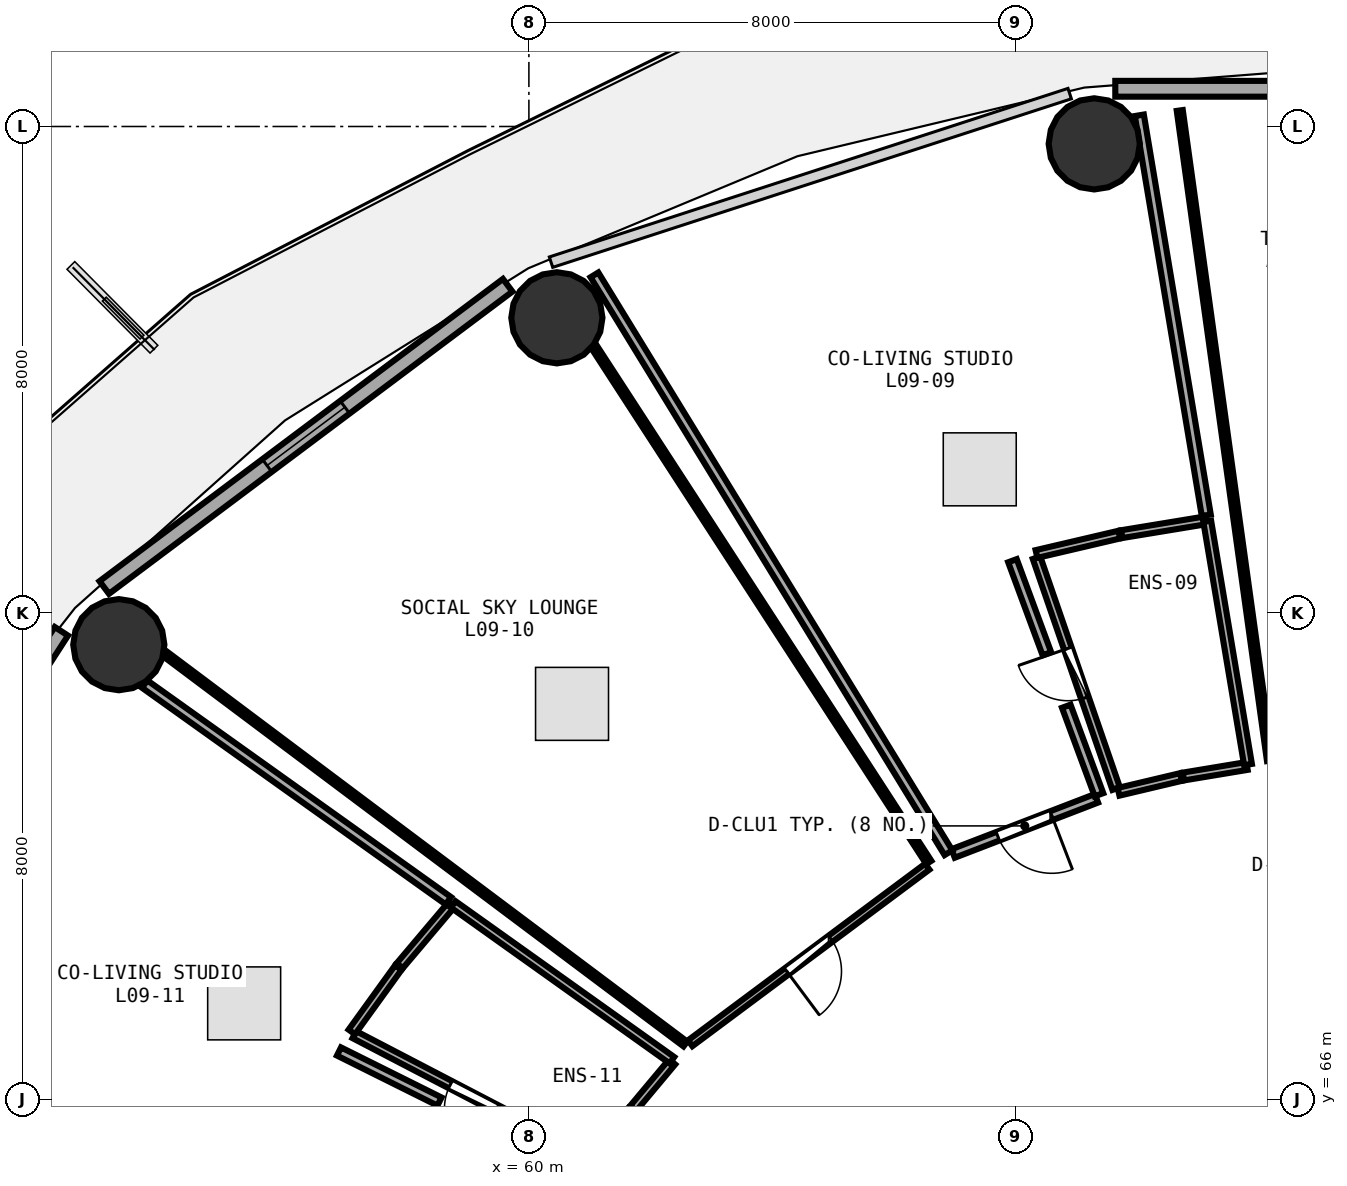
"""IFC4 building model, lengths in metres.
Left out: names, types, materials, properties, quantities, classifications, styles, units other than length and angle.
Written with IfcOpenShell. Run it as: python <this file> out.ifc"""

import sys

from ifc_helpers import new_model, si_unit, direction, frame, frame_2d, origin, origin_2d, place, context, subcontext, project, spatial, rectangle, circle, extrude, element, fill, save


model = new_model("IFC4")
c1 = context("Model", 3, precision=1e-05, world=origin(), true_north=direction((0.0, 1.0)))
c2 = subcontext(c1, "Body", "Model", "MODEL_VIEW")
j1 = project(units=[si_unit("LENGTHUNIT", "METRE"), si_unit("PLANEANGLEUNIT", "RADIAN")], contexts=[c1])
p1 = place(None, origin())
s1 = spatial("IfcSite", under=j1, at=p1, CompositionType="ELEMENT")
p2 = place(p1, origin())
s2 = spatial("IfcBuilding", under=s1, at=p2, CompositionType="ELEMENT")
p3 = place(p2, frame((0.0, 0.0, 37.5)))
s3 = spatial("IfcBuildingStorey", under=s2, at=p3, CompositionType="ELEMENT", Elevation=37.5)
for number, where, z_axis, x_axis in (
    (1, (69.298, 81.714, 0.0), (0.0, 0.0, 1.0), (1.0, 0.0, 0.0)),
    (2, (60.46, 78.854, 0.0), (0.0, 0.0, 1.0), (1.0, 0.0, 0.0)),
    (3, (53.256, 73.478, 0.0), (0.0, 0.0, 1.0), (1.0, 0.0, 0.0)),
):
    element("IfcColumn", number, at=place(p3, frame(where, z_axis=z_axis, x_axis=x_axis)), inside=s3, PredefinedType="COLUMN", context=c2, shape_type="SweptSolid", body=[
        extrude(circle(Radius=0.75, at=origin_2d()), origin(), (0.0, 0.0, 1.0), 3.75),
    ])
p4 = place(p3, frame((78.356, 82.62, 0.0), z_axis=(0.0, 0.0, 1.0), x_axis=(-1.0, 0.0, 0.0)))
e4 = element("IfcWall", 4, at=p4, inside=s3, PredefinedType="SOLIDWALL", context=c2, shape_type="SweptSolid", body=[
    extrude(rectangle(XDim=8.712, YDim=0.26, at=frame_2d((4.356, 0.0))), origin(), (0.0, 0.0, 1.0), 3.475),
])
p5 = place(p4, frame((3.556, 0.0, 0.85)))
e5 = element("IfcOpeningElement", 5, at=p5, cuts=e4, PredefinedType="OPENING", context=c2, shape_type="SweptSolid", body=[
    extrude(rectangle(XDim=1.6, YDim=1.45, at=frame_2d((0.8, 0.725))), frame((0.0, 0.14, 0.0), z_axis=(0.0, -1.0, 0.0), x_axis=(1.0, 0.0, 0.0)), (0.0, 0.0, 1.0), 0.28),
])
p6 = place(p3, frame((59.651, 79.389, 0.0), z_axis=(0.0, 0.0, 1.0), x_axis=(-0.80030733173, -0.599590005569, 0.0)))
e6 = element("IfcWall", 6, at=p6, inside=s3, PredefinedType="SOLIDWALL", context=c2, shape_type="SweptSolid", body=[
    extrude(rectangle(XDim=8.291, YDim=0.26, at=frame_2d((4.145, 0.0))), origin(), (0.0, 0.0, 1.0), 3.475),
])
p7 = place(p6, frame((3.345, 0.0, 0.85)))
e7 = element("IfcOpeningElement", 7, at=p7, cuts=e6, PredefinedType="OPENING", context=c2, shape_type="SweptSolid", body=[
    extrude(rectangle(XDim=1.6, YDim=1.45, at=frame_2d((0.8, 0.725))), frame((0.0, 0.14, 0.0), z_axis=(0.0, -1.0, 0.0), x_axis=(1.0, 0.0, 0.0)), (0.0, 0.0, 1.0), 0.28),
])
p8 = place(p3, frame((52.311, 73.698, 0.0), z_axis=(0.0, 0.0, 1.0), x_axis=(-0.543005114258, -0.839729388488, 0.0)))
e8 = element("IfcWall", 8, at=p8, inside=s3, PredefinedType="SOLIDWALL", context=c2, shape_type="SweptSolid", body=[
    extrude(rectangle(XDim=7.938, YDim=0.26, at=frame_2d((3.969, 0.0))), origin(), (0.0, 0.0, 1.0), 3.475),
])
p9 = place(p8, frame((3.494, 0.0, 0.0)))
e9 = element("IfcOpeningElement", 9, at=p9, cuts=e8, PredefinedType="OPENING", context=c2, shape_type="SweptSolid", body=[
    extrude(rectangle(XDim=0.95, YDim=2.1, at=frame_2d((0.475, 1.05))), frame((0.0, 0.14, 0.0), z_axis=(0.0, -1.0, 0.0), x_axis=(1.0, 0.0, 0.0)), (0.0, 0.0, 1.0), 0.28),
])
p10 = place(p8, frame((4.794, 0.0, 0.85)))
e10 = element("IfcOpeningElement", 10, at=p10, cuts=e8, PredefinedType="OPENING", context=c2, shape_type="SweptSolid", body=[
    extrude(rectangle(XDim=1.2, YDim=1.45, at=frame_2d((0.6, 0.725))), frame((0.0, 0.14, 0.0), z_axis=(0.0, -1.0, 0.0), x_axis=(1.0, 0.0, 0.0)), (0.0, 0.0, 1.0), 0.28),
])
p11 = place(p3, frame((69.658, 71.111, 0.0), z_axis=(0.0, 0.0, 1.0), x_axis=(-0.326056236537, 0.945350374525, 0.0)))
e11 = element("IfcWall", 11, at=p11, inside=s3, PredefinedType="PLUMBINGWALL", context=c2, shape_type="SweptSolid", body=[
    extrude(rectangle(XDim=4.017, YDim=0.13, at=frame_2d((2.009, 0.0))), origin(), (0.0, 0.0, 1.0), 3.175),
])
p12 = place(p11, frame((1.579, 0.0, 0.0)))
e12 = element("IfcOpeningElement", 12, at=p12, cuts=e11, PredefinedType="OPENING", context=c2, shape_type="SweptSolid", body=[
    extrude(rectangle(XDim=0.86, YDim=2.05, at=frame_2d((0.43, 1.025))), frame((0.0, 0.075, 0.0), z_axis=(0.0, -1.0, 0.0), x_axis=(1.0, 0.0, 0.0)), (0.0, 0.0, 1.0), 0.15),
])
p13 = place(p3, frame((69.334, 70.951, 0.0), z_axis=(0.0, 0.0, 1.0), x_axis=(-0.933283302704, -0.35914102647, 0.0)))
e13 = element("IfcWall", 13, at=p13, inside=s3, PredefinedType="PARTITIONING", context=c2, shape_type="SweptSolid", body=[
    extrude(rectangle(XDim=2.525, YDim=0.15, at=frame_2d((1.263, 0.0))), origin(), (0.0, 0.0, 1.0), 3.48),
])
p14 = place(p13, frame((0.788, 0.0, 0.0)))
e14 = element("IfcOpeningElement", 14, at=p14, cuts=e13, PredefinedType="OPENING", context=c2, shape_type="SweptSolid", body=[
    extrude(rectangle(XDim=0.95, YDim=2.08, at=frame_2d((0.475, 1.04))), frame((0.0, 0.085, 0.0), z_axis=(0.0, -1.0, 0.0), x_axis=(1.0, 0.0, 0.0)), (0.0, 0.0, 1.0), 0.17),
])
p15 = place(p3, frame((66.551, 69.827, 0.0), z_axis=(0.0, 0.0, 1.0), x_axis=(-0.801966818386, -0.597368581537, 0.0)))
e15 = element("IfcWall", 15, at=p15, inside=s3, PredefinedType="PARTITIONING", context=c2, shape_type="SweptSolid", body=[
    extrude(rectangle(XDim=4.86, YDim=0.12, at=frame_2d((2.43, 0.0))), origin(), (0.0, 0.0, 1.0), 2.875),
])
p16 = place(p15, frame((1.98, 0.0, 0.0)))
e16 = element("IfcOpeningElement", 16, at=p16, cuts=e15, PredefinedType="OPENING", context=c2, shape_type="SweptSolid", body=[
    extrude(rectangle(XDim=0.9, YDim=2.08, at=frame_2d((0.45, 1.04))), frame((0.0, 0.07, 0.0), z_axis=(0.0, -1.0, 0.0), x_axis=(1.0, 0.0, 0.0)), (0.0, 0.0, 1.0), 0.14),
])
p17 = place(p3, frame((61.049, 65.025, 0.0), z_axis=(0.0, 0.0, 1.0), x_axis=(-0.887004135063, 0.461761479966, 0.0)))
e17 = element("IfcWall", 17, at=p17, inside=s3, PredefinedType="PLUMBINGWALL", context=c2, shape_type="SweptSolid", body=[
    extrude(rectangle(XDim=4.419, YDim=0.13, at=frame_2d((2.209, 0.0))), origin(), (0.0, 0.0, 1.0), 2.875),
])
p18 = place(p17, frame((1.779, 0.0, 0.0)))
e18 = element("IfcOpeningElement", 18, at=p18, cuts=e17, PredefinedType="OPENING", context=c2, shape_type="SweptSolid", body=[
    extrude(rectangle(XDim=0.86, YDim=2.05, at=frame_2d((0.43, 1.025))), frame((0.0, 0.075, 0.0), z_axis=(0.0, -1.0, 0.0), x_axis=(1.0, 0.0, 0.0)), (0.0, 0.0, 1.0), 0.15),
])
p19 = place(p3, frame((72.188, 71.571, 0.0), z_axis=(0.0, 0.0, 1.0), x_axis=(-0.137456200911, 0.990507845921, 0.0)))
e19 = element("IfcWall", 19, at=p19, inside=s3, PredefinedType="PARTITIONING", context=c2, shape_type="SweptSolid", body=[
    extrude(rectangle(XDim=10.795, YDim=0.1, at=frame_2d((5.398, 0.0))), origin(), (0.0, 0.0, 1.0), 2.875),
])
p20 = place(p3, frame((71.81, 71.484, 0.0), z_axis=(0.0, 0.0, 1.0), x_axis=(-0.986536732665, -0.163539827269, 0.0)))
e20 = element("IfcWall", 20, at=p20, inside=s3, PredefinedType="PLUMBINGWALL", context=c2, shape_type="SweptSolid", body=[
    extrude(rectangle(XDim=1.06, YDim=0.13, at=frame_2d((0.53, 0.0))), origin(), (0.0, 0.0, 1.0), 2.875),
])
p21 = place(p3, frame((70.726, 71.302, 0.0), z_axis=(0.0, 0.0, 1.0), x_axis=(-0.972994310962, -0.230829094431, 0.0)))
e21 = element("IfcWall", 21, at=p21, inside=s3, PredefinedType="PLUMBINGWALL", context=c2, shape_type="SweptSolid", body=[
    extrude(rectangle(XDim=1.057, YDim=0.13, at=frame_2d((0.528, 0.0))), origin(), (0.0, 0.0, 1.0), 2.875),
])
p22 = place(p3, frame((68.348, 74.969, 0.0), z_axis=(0.0, 0.0, 1.0), x_axis=(0.973677466502, 0.227930233241, 0.0)))
e22 = element("IfcWall", 22, at=p22, inside=s3, PredefinedType="PLUMBINGWALL", context=c2, shape_type="SweptSolid", body=[
    extrude(rectangle(XDim=1.399, YDim=0.13, at=frame_2d((0.699, 0.0))), origin(), (0.0, 0.0, 1.0), 3.48),
])
p23 = place(p3, frame((69.75, 75.296, 0.0), z_axis=(0.0, 0.0, 1.0), x_axis=(0.986744598887, 0.162280918681, 0.0)))
e23 = element("IfcWall", 23, at=p23, inside=s3, PredefinedType="PLUMBINGWALL", context=c2, shape_type="SweptSolid", body=[
    extrude(rectangle(XDim=1.402, YDim=0.13, at=frame_2d((0.701, 0.0))), origin(), (0.0, 0.0, 1.0), 2.875),
])
p24 = place(p3, frame((71.156, 75.507, 0.0), z_axis=(0.0, 0.0, 1.0), x_axis=(0.165267537024, -0.986248772474, 0.0)))
e24 = element("IfcWall", 24, at=p24, inside=s3, PredefinedType="PLUMBINGWALL", context=c2, shape_type="SweptSolid", body=[
    extrude(rectangle(XDim=4.056, YDim=0.13, at=frame_2d((2.028, 0.0))), origin(), (0.0, 0.0, 1.0), 3.175),
])
p25 = place(p3, frame((66.9, 70.057, 0.0), z_axis=(0.0, 0.0, 1.0), x_axis=(-0.522434140672, 0.852679640111, 0.0)))
e25 = element("IfcWall", 25, at=p25, inside=s3, PredefinedType="PARTITIONING", context=c2, shape_type="SweptSolid", body=[
    extrude(rectangle(XDim=11.145, YDim=0.15, at=frame_2d((5.572, 0.0))), origin(), (0.0, 0.0, 1.0), 2.875),
])
p26 = place(p3, frame((70.04, 82.185, 0.0), z_axis=(0.0, 0.0, 1.0), x_axis=(0.165051905183, -0.986284882068, 0.0)))
e26 = element("IfcWall", 26, at=p26, inside=s3, PredefinedType="PARTITIONING", context=c2, shape_type="SweptSolid", body=[
    extrude(rectangle(XDim=6.67, YDim=0.15, at=frame_2d((3.335, 0.0))), origin(), (0.0, 0.0, 1.0), 2.875),
])
p27 = place(p3, frame((67.953, 74.86, 0.0), z_axis=(0.0, 0.0, 1.0), x_axis=(0.346856200849, -0.937918320502, 0.0)))
e27 = element("IfcWall", 27, at=p27, inside=s3, PredefinedType="PARTITIONING", context=c2, shape_type="SweptSolid", body=[
    extrude(rectangle(XDim=1.632, YDim=0.15, at=frame_2d((0.816, 0.0))), origin(), (0.0, 0.0, 1.0), 3.175),
])
p28 = place(p3, frame((68.838, 72.466, 0.0), z_axis=(0.0, 0.0, 1.0), x_axis=(0.346827635281, -0.937928883981, 0.0)))
e28 = element("IfcWall", 28, at=p28, inside=s3, PredefinedType="PARTITIONING", context=c2, shape_type="SweptSolid", body=[
    extrude(rectangle(XDim=1.552, YDim=0.15, at=frame_2d((0.776, 0.0))), origin(), (0.0, 0.0, 1.0), 3.235),
])
p29 = place(p3, frame((62.573, 66.912, 0.0), z_axis=(0.0, 0.0, 1.0), x_axis=(-0.800175286691, 0.599766213261, 0.0)))
e29 = element("IfcWall", 29, at=p29, inside=s3, PredefinedType="PARTITIONING", context=c2, shape_type="SweptSolid", body=[
    extrude(rectangle(XDim=10.695, YDim=0.1, at=frame_2d((5.347, 0.0))), origin(), (0.0, 0.0, 1.0), 2.875),
])
p30 = place(p3, frame((61.071, 78.377, 0.0), z_axis=(0.0, 0.0, 1.0), x_axis=(0.544546108356, -0.838730907904, 0.0)))
e30 = element("IfcWall", 30, at=p30, inside=s3, PredefinedType="PARTITIONING", context=c2, shape_type="SweptSolid", body=[
    extrude(rectangle(XDim=10.111, YDim=0.1, at=frame_2d((5.056, 0.0))), origin(), (0.0, 0.0, 1.0), 3.175),
])
p31 = place(p3, frame((62.356, 66.618, 0.0), z_axis=(0.0, 0.0, 1.0), x_axis=(-0.641793013208, -0.766877909577, 0.0)))
e31 = element("IfcWall", 31, at=p31, inside=s3, PredefinedType="PLUMBINGWALL", context=c2, shape_type="SweptSolid", body=[
    extrude(rectangle(XDim=0.999, YDim=0.13, at=frame_2d((0.5, 0.0))), origin(), (0.0, 0.0, 1.0), 3.48),
])
p32 = place(p3, frame((57.088, 67.109, 0.0), z_axis=(0.0, 0.0, 1.0), x_axis=(0.585545160258, 0.810639787636, 0.0)))
e32 = element("IfcWall", 32, at=p32, inside=s3, PredefinedType="PLUMBINGWALL", context=c2, shape_type="SweptSolid", body=[
    extrude(rectangle(XDim=1.306, YDim=0.13, at=frame_2d((0.653, 0.0))), origin(), (0.0, 0.0, 1.0), 3.48),
])
p33 = place(p3, frame((57.877, 68.199, 0.0), z_axis=(0.0, 0.0, 1.0), x_axis=(0.645609332361, 0.763667853172, 0.0)))
e33 = element("IfcWall", 33, at=p33, inside=s3, PredefinedType="PLUMBINGWALL", context=c2, shape_type="SweptSolid", body=[
    extrude(rectangle(XDim=1.315, YDim=0.13, at=frame_2d((0.658, 0.0))), origin(), (0.0, 0.0, 1.0), 3.48),
])
p34 = place(p3, frame((58.755, 69.208, 0.0), z_axis=(0.0, 0.0, 1.0), x_axis=(0.814438714594, -0.580249584378, 0.0)))
e34 = element("IfcWall", 34, at=p34, inside=s3, PredefinedType="PLUMBINGWALL", context=c2, shape_type="SweptSolid", body=[
    extrude(rectangle(XDim=4.417, YDim=0.13, at=frame_2d((2.208, 0.0))), origin(), (0.0, 0.0, 1.0), 3.235),
])
p35 = place(p3, frame((59.794, 62.562, 0.0), z_axis=(0.0, 0.0, 1.0), x_axis=(-0.955526502323, 0.294905244712, 0.0)))
e35 = element("IfcWall", 35, at=p35, inside=s3, PredefinedType="PARTITIONING", context=c2, shape_type="SweptSolid", body=[
    extrude(rectangle(XDim=11.074, YDim=0.15, at=frame_2d((5.537, 0.0))), origin(), (0.0, 0.0, 1.0), 3.175),
])
p36 = place(p3, frame((53.681, 72.83, 0.0), z_axis=(0.0, 0.0, 1.0), x_axis=(0.81406941819, -0.580767580335, 0.0)))
e36 = element("IfcWall", 36, at=p36, inside=s3, PredefinedType="PARTITIONING", context=c2, shape_type="SweptSolid", body=[
    extrude(rectangle(XDim=6.135, YDim=0.15, at=frame_2d((3.068, 0.0))), origin(), (0.0, 0.0, 1.0), 3.175),
])
p37 = place(p3, frame((56.877, 66.788, 0.0), z_axis=(0.0, 0.0, 1.0), x_axis=(0.895219183004, -0.445626092573, 0.0)))
e37 = element("IfcWall", 37, at=p37, inside=s3, PredefinedType="PARTITIONING", context=c2, shape_type="SweptSolid", body=[
    extrude(rectangle(XDim=1.846, YDim=0.15, at=frame_2d((0.923, 0.0))), origin(), (0.0, 0.0, 1.0), 3.48),
])
p38 = place(p7, origin())
e38 = element("IfcWindow", 38, at=p38, inside=s3, PartitioningType="SINGLE_PANEL", PredefinedType="WINDOW", context=c2, shape_type="SweptSolid", body=[
    extrude(rectangle(XDim=1.6, YDim=1.45, at=frame_2d((0.8, 0.725))), frame((0.0, 0.03, 0.0), z_axis=(0.0, -1.0, 0.0), x_axis=(1.0, 0.0, 0.0)), (0.0, 0.0, 1.0), 0.06),
])
fill(e7, e38)
p39 = place(p12, origin())
e39 = element("IfcDoor", 39, at=p39, inside=s3, OperationType="SINGLE_SWING_RIGHT", PredefinedType="DOOR", context=c2, shape_type="SweptSolid", body=[
    extrude(rectangle(XDim=0.86, YDim=2.05, at=frame_2d((0.43, 1.025))), frame((0.0, 0.025, 0.0), z_axis=(0.0, -1.0, 0.0), x_axis=(1.0, 0.0, 0.0)), (0.0, 0.0, 1.0), 0.05),
])
fill(e12, e39)
p40 = place(p14, origin())
e40 = element("IfcDoor", 40, at=p40, inside=s3, OperationType="SINGLE_SWING_LEFT", PredefinedType="DOOR", context=c2, shape_type="SweptSolid", body=[
    extrude(rectangle(XDim=0.95, YDim=2.08, at=frame_2d((0.475, 1.04))), frame((0.0, 0.025, 0.0), z_axis=(0.0, -1.0, 0.0), x_axis=(1.0, 0.0, 0.0)), (0.0, 0.0, 1.0), 0.05),
])
fill(e14, e40)
p41 = place(p16, origin())
e41 = element("IfcDoor", 41, at=p41, inside=s3, OperationType="SINGLE_SWING_RIGHT", PredefinedType="DOOR", context=c2, shape_type="SweptSolid", body=[
    extrude(rectangle(XDim=0.9, YDim=2.08, at=frame_2d((0.45, 1.04))), frame((0.0, 0.025, 0.0), z_axis=(0.0, -1.0, 0.0), x_axis=(1.0, 0.0, 0.0)), (0.0, 0.0, 1.0), 0.05),
])
fill(e16, e41)
p42 = place(p18, origin())
e42 = element("IfcDoor", 42, at=p42, inside=s3, OperationType="SINGLE_SWING_LEFT", PredefinedType="DOOR", context=c2, shape_type="SweptSolid", body=[
    extrude(rectangle(XDim=0.86, YDim=2.05, at=frame_2d((0.43, 1.025))), frame((0.0, 0.025, 0.0), z_axis=(0.0, -1.0, 0.0), x_axis=(1.0, 0.0, 0.0)), (0.0, 0.0, 1.0), 0.05),
])
fill(e18, e42)
save(model, sys.argv[1])
